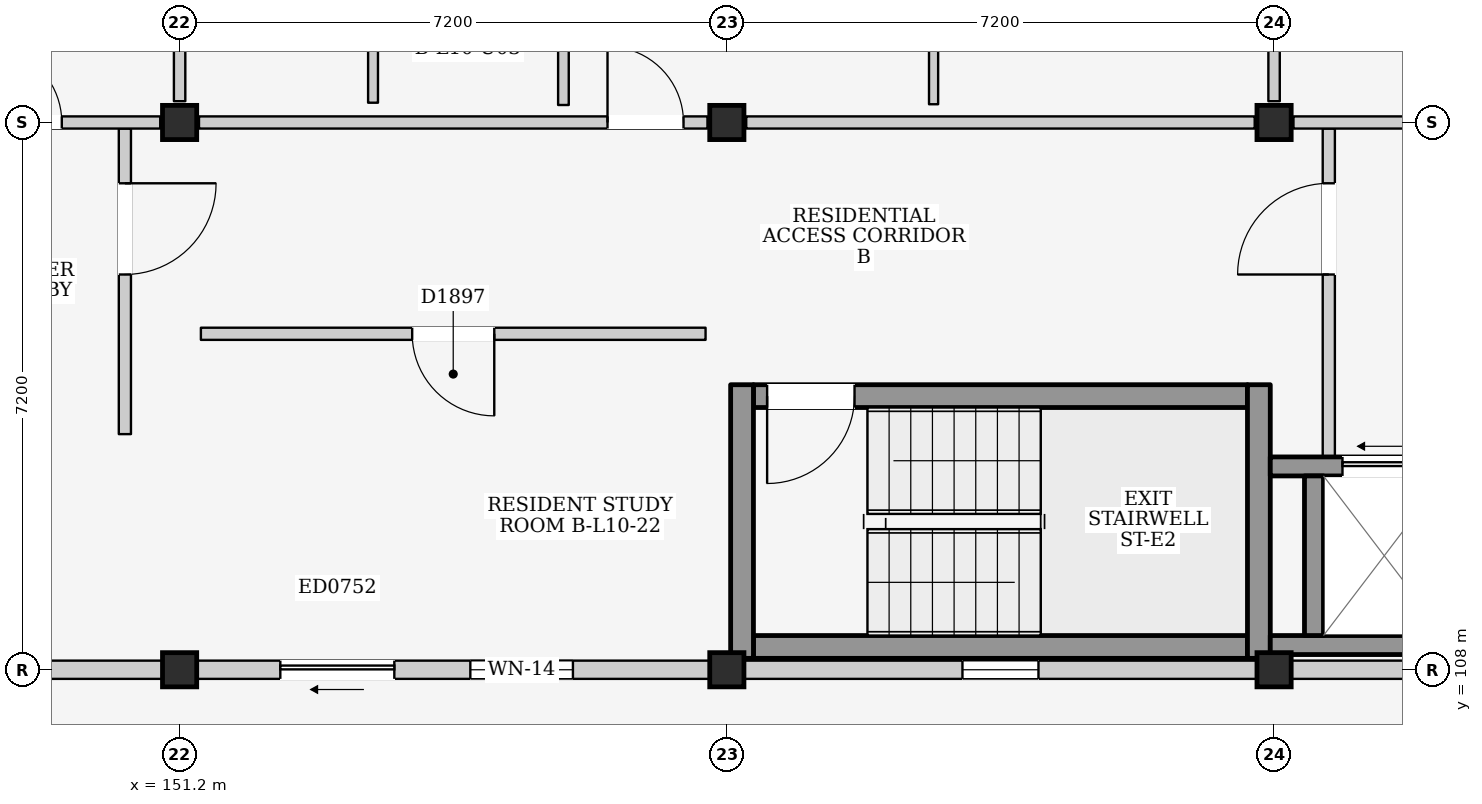
"""IFC4 building model, lengths in metres.
Left out: names, types, materials, properties, quantities, classifications, styles, units other than length and angle.
Written with IfcOpenShell. Run it as: python <this file> out.ifc"""

import sys

from ifc_helpers import new_model, si_unit, direction, frame, frame_2d, origin, origin_2d, place, context, subcontext, project, spatial, rectangle, extrude, element, fill, save


model = new_model("IFC4")
c1 = context("Model", 3, precision=1e-05, world=origin(), true_north=direction((0.0, 1.0)))
c2 = subcontext(c1, "Body", "Model", "MODEL_VIEW")
j1 = project(units=[si_unit("LENGTHUNIT", "METRE"), si_unit("PLANEANGLEUNIT", "RADIAN")], contexts=[c1])
p1 = place(None, origin())
s1 = spatial("IfcSite", under=j1, at=p1, CompositionType="ELEMENT")
p2 = place(p1, origin())
s2 = spatial("IfcBuilding", under=s1, at=p2, CompositionType="ELEMENT")
p3 = place(p2, frame((0.0, 0.0, 34.8)))
s3 = spatial("IfcBuildingStorey", under=s2, at=p3, CompositionType="ELEMENT", Elevation=34.8)
for number, where, z_axis, x_axis in (
    (1, (151.2, 108.0, 0.0), (0.0, 0.0, 1.0), (1.0, 0.0, 0.0)),
    (2, (151.2, 115.2, 0.0), (0.0, 0.0, 1.0), (1.0, 0.0, 0.0)),
    (3, (158.4, 108.0, 0.0), (0.0, 0.0, 1.0), (1.0, 0.0, 0.0)),
    (4, (158.4, 115.2, 0.0), (0.0, 0.0, 1.0), (1.0, 0.0, 0.0)),
    (5, (165.6, 108.0, 0.0), (0.0, 0.0, 1.0), (1.0, 0.0, 0.0)),
    (6, (165.6, 115.2, 0.0), (0.0, 0.0, 1.0), (1.0, 0.0, 0.0)),
):
    element("IfcColumn", number, at=place(p3, frame(where, z_axis=z_axis, x_axis=x_axis)), inside=s3, PredefinedType="COLUMN", context=c2, shape_type="SweptSolid", body=[
        extrude(rectangle(XDim=0.45, YDim=0.45, at=origin_2d()), origin(), (0.0, 0.0, 1.0), 3.2),
    ])
p4 = place(p3, frame((144.225, 108.0, 0.0), z_axis=(0.0, 0.0, 1.0), x_axis=(1.0, 0.0, 0.0)))
e7 = element("IfcWall", 7, at=p4, inside=s3, PredefinedType="ELEMENTEDWALL", context=c2, shape_type="SweptSolid", body=[
    extrude(rectangle(XDim=6.75, YDim=0.24, at=frame_2d((3.375, 0.0))), origin(), (0.0, 0.0, 1.0), 2.345),
])
p5 = place(p4, frame((2.875, 0.0, 1.2)))
e8 = element("IfcOpeningElement", 8, at=p5, cuts=e7, PredefinedType="OPENING", context=c2, shape_type="SweptSolid", body=[
    extrude(rectangle(XDim=1.0, YDim=0.9, at=frame_2d((0.5, 0.45))), frame((0.0, 0.135, 0.0), z_axis=(0.0, -1.0, 0.0), x_axis=(1.0, 0.0, 0.0)), (0.0, 0.0, 1.0), 0.27),
])
p6 = place(p3, frame((151.425, 108.0, 0.0), z_axis=(0.0, 0.0, 1.0), x_axis=(1.0, 0.0, 0.0)))
e9 = element("IfcWall", 9, at=p6, inside=s3, PredefinedType="ELEMENTEDWALL", context=c2, shape_type="SweptSolid", body=[
    extrude(rectangle(XDim=6.75, YDim=0.24, at=frame_2d((3.375, 0.0))), origin(), (0.0, 0.0, 1.0), 2.345),
])
p7 = place(p6, frame((1.1, 0.0, 0.0)))
e10 = element("IfcOpeningElement", 10, at=p7, cuts=e9, PredefinedType="OPENING", context=c2, shape_type="SweptSolid", body=[
    extrude(rectangle(XDim=1.5, YDim=2.12, at=frame_2d((0.75, 1.06))), frame((0.0, 0.135, 0.0), z_axis=(0.0, -1.0, 0.0), x_axis=(1.0, 0.0, 0.0)), (0.0, 0.0, 1.0), 0.27),
])
p8 = place(p6, frame((3.6, 0.0, 0.735)))
e11 = element("IfcOpeningElement", 11, at=p8, cuts=e9, PredefinedType="OPENING", context=c2, shape_type="SweptSolid", body=[
    extrude(rectangle(XDim=1.35, YDim=1.5, at=frame_2d((0.675, 0.75))), frame((0.0, 0.135, 0.0), z_axis=(0.0, -1.0, 0.0), x_axis=(1.0, 0.0, 0.0)), (0.0, 0.0, 1.0), 0.27),
])
p9 = place(p3, frame((158.625, 108.0, 0.0), z_axis=(0.0, 0.0, 1.0), x_axis=(1.0, 0.0, 0.0)))
e12 = element("IfcWall", 12, at=p9, inside=s3, PredefinedType="ELEMENTEDWALL", context=c2, shape_type="SweptSolid", body=[
    extrude(rectangle(XDim=6.75, YDim=0.24, at=frame_2d((3.375, 0.0))), origin(), (0.0, 0.0, 1.0), 2.345),
])
p10 = place(p9, frame((2.875, 0.0, 1.2)))
e13 = element("IfcOpeningElement", 13, at=p10, cuts=e12, PredefinedType="OPENING", context=c2, shape_type="SweptSolid", body=[
    extrude(rectangle(XDim=1.0, YDim=0.9, at=frame_2d((0.5, 0.45))), frame((0.0, 0.135, 0.0), z_axis=(0.0, -1.0, 0.0), x_axis=(1.0, 0.0, 0.0)), (0.0, 0.0, 1.0), 0.27),
])
p11 = place(p3, frame((165.825, 108.0, 0.0), z_axis=(0.0, 0.0, 1.0), x_axis=(1.0, 0.0, 0.0)))
e14 = element("IfcWall", 14, at=p11, inside=s3, PredefinedType="ELEMENTEDWALL", context=c2, shape_type="SweptSolid", body=[
    extrude(rectangle(XDim=6.75, YDim=0.24, at=frame_2d((3.375, 0.0))), origin(), (0.0, 0.0, 1.0), 2.345),
])
p12 = place(p11, frame((2.875, 0.0, 1.2)))
e15 = element("IfcOpeningElement", 15, at=p12, cuts=e14, PredefinedType="OPENING", context=c2, shape_type="SweptSolid", body=[
    extrude(rectangle(XDim=1.0, YDim=0.9, at=frame_2d((0.5, 0.45))), frame((0.0, 0.135, 0.0), z_axis=(0.0, -1.0, 0.0), x_axis=(1.0, 0.0, 0.0)), (0.0, 0.0, 1.0), 0.27),
])
p13 = place(p3, frame((150.48, 111.1, 0.0), z_axis=(0.0, 0.0, 1.0), x_axis=(0.0, 1.0, 0.0)))
e16 = element("IfcWall", 16, at=p13, inside=s3, PredefinedType="PARTITIONING", context=c2, shape_type="SweptSolid", body=[
    extrude(rectangle(XDim=4.02, YDim=0.16, at=frame_2d((2.01, 0.0))), origin(), (0.0, 0.0, 1.0), 2.96),
])
p14 = place(p13, frame((2.1, 0.0, 0.0)))
e17 = element("IfcOpeningElement", 17, at=p14, cuts=e16, PredefinedType="OPENING", context=c2, shape_type="SweptSolid", body=[
    extrude(rectangle(XDim=1.2, YDim=2.2, at=frame_2d((0.6, 1.1))), frame((0.0, 0.095, 0.0), z_axis=(0.0, -1.0, 0.0), x_axis=(1.0, 0.0, 0.0)), (0.0, 0.0, 1.0), 0.19),
])
p15 = place(p3, frame((158.75, 108.3, 0.0), z_axis=(0.0, 0.0, 1.0), x_axis=(1.0, 0.0, 0.0)))
e18 = element("IfcWall", 18, at=p15, inside=s3, PredefinedType="SHEAR", context=c2, shape_type="SweptSolid", body=[
    extrude(rectangle(XDim=6.5, YDim=0.3, at=frame_2d((3.25, 0.0))), origin(), (0.0, 0.0, 1.0), 2.96),
])
p16 = place(p3, frame((158.75, 111.6, 0.0), z_axis=(0.0, 0.0, 1.0), x_axis=(1.0, 0.0, 0.0)))
e19 = element("IfcWall", 19, at=p16, inside=s3, PredefinedType="SHEAR", context=c2, shape_type="SweptSolid", body=[
    extrude(rectangle(XDim=6.5, YDim=0.3, at=frame_2d((3.25, 0.0))), origin(), (0.0, 0.0, 1.0), 2.96),
])
p17 = place(p16, frame((0.18, 0.0, 0.0)))
e20 = element("IfcOpeningElement", 20, at=p17, cuts=e19, PredefinedType="OPENING", context=c2, shape_type="SweptSolid", body=[
    extrude(rectangle(XDim=1.15, YDim=2.2, at=frame_2d((0.575, 1.1))), frame((0.0, 0.165, 0.0), z_axis=(0.0, -1.0, 0.0), x_axis=(1.0, 0.0, 0.0)), (0.0, 0.0, 1.0), 0.33),
])
for number, where, z_axis, x_axis in (
    (21, (158.6, 108.15, 0.0), (0.0, 0.0, 1.0), (0.0, 1.0, 0.0)),
    (22, (165.4, 108.15, 0.0), (0.0, 0.0, 1.0), (0.0, 1.0, 0.0)),
):
    element("IfcWall", number, at=place(p3, frame(where, z_axis=z_axis, x_axis=x_axis)), inside=s3, PredefinedType="SHEAR", context=c2, shape_type="SweptSolid", body=[
        extrude(rectangle(XDim=3.6, YDim=0.3, at=frame_2d((1.8, 0.0))), origin(), (0.0, 0.0, 1.0), 2.96),
    ])
p18 = place(p3, frame((166.32, 110.8, 0.0), z_axis=(0.0, 0.0, 1.0), x_axis=(0.0, 1.0, 0.0)))
e23 = element("IfcWall", 23, at=p18, inside=s3, PredefinedType="PARTITIONING", context=c2, shape_type="SweptSolid", body=[
    extrude(rectangle(XDim=4.32, YDim=0.16, at=frame_2d((2.16, 0.0))), origin(), (0.0, 0.0, 1.0), 2.96),
])
p19 = place(p18, frame((2.4, 0.0, 0.0)))
e24 = element("IfcOpeningElement", 24, at=p19, cuts=e23, PredefinedType="OPENING", context=c2, shape_type="SweptSolid", body=[
    extrude(rectangle(XDim=1.2, YDim=2.2, at=frame_2d((0.6, 1.1))), frame((0.0, 0.095, 0.0), z_axis=(0.0, -1.0, 0.0), x_axis=(1.0, 0.0, 0.0)), (0.0, 0.0, 1.0), 0.19),
])
p20 = place(p3, frame((165.55, 108.325, 0.0), z_axis=(0.0, 0.0, 1.0), x_axis=(1.0, 0.0, 0.0)))
e25 = element("IfcWall", 25, at=p20, inside=s3, PredefinedType="SHEAR", context=c2, shape_type="SweptSolid", body=[
    extrude(rectangle(XDim=2.55, YDim=0.25, at=frame_2d((1.275, 0.0))), origin(), (0.0, 0.0, 1.0), 2.96),
])
p21 = place(p3, frame((165.55, 110.675, 0.0), z_axis=(0.0, 0.0, 1.0), x_axis=(1.0, 0.0, 0.0)))
e26 = element("IfcWall", 26, at=p21, inside=s3, PredefinedType="SHEAR", context=c2, shape_type="SweptSolid", body=[
    extrude(rectangle(XDim=2.55, YDim=0.25, at=frame_2d((1.275, 0.0))), origin(), (0.0, 0.0, 1.0), 2.96),
])
p22 = place(p21, frame((0.95, 0.0, 0.0)))
e27 = element("IfcOpeningElement", 27, at=p22, cuts=e26, PredefinedType="OPENING", context=c2, shape_type="SweptSolid", body=[
    extrude(rectangle(XDim=1.1, YDim=2.15, at=frame_2d((0.55, 1.075))), frame((0.0, 0.14, 0.0), z_axis=(0.0, -1.0, 0.0), x_axis=(1.0, 0.0, 0.0)), (0.0, 0.0, 1.0), 0.28),
])
p23 = place(p3, frame((166.125, 108.45, 0.0), z_axis=(0.0, 0.0, 1.0), x_axis=(0.0, 1.0, 0.0)))
e28 = element("IfcWall", 28, at=p23, inside=s3, PredefinedType="SHEAR", context=c2, shape_type="SweptSolid", body=[
    extrude(rectangle(XDim=2.1, YDim=0.25, at=frame_2d((1.05, 0.0))), origin(), (0.0, 0.0, 1.0), 2.96),
])
p24 = place(p3, frame((144.255, 115.2, 0.0), z_axis=(0.0, 0.0, 1.0), x_axis=(1.0, 0.0, 0.0)))
e29 = element("IfcWall", 29, at=p24, inside=s3, PredefinedType="PARTITIONING", context=c2, shape_type="SweptSolid", body=[
    extrude(rectangle(XDim=6.69, YDim=0.16, at=frame_2d((3.345, 0.0))), origin(), (0.0, 0.0, 1.0), 2.345),
])
p25 = place(p24, frame((4.395, 0.0, 0.0)))
e30 = element("IfcOpeningElement", 30, at=p25, cuts=e29, PredefinedType="OPENING", context=c2, shape_type="SweptSolid", body=[
    extrude(rectangle(XDim=1.0, YDim=2.15, at=frame_2d((0.5, 1.075))), frame((0.0, 0.095, 0.0), z_axis=(0.0, -1.0, 0.0), x_axis=(1.0, 0.0, 0.0)), (0.0, 0.0, 1.0), 0.19),
])
p26 = place(p3, frame((151.2, 115.48, 0.0), z_axis=(0.0, 0.0, 1.0), x_axis=(0.0, 1.0, 0.0)))
e31 = element("IfcWall", 31, at=p26, inside=s3, PredefinedType="PARTITIONING", context=c2, shape_type="SweptSolid", body=[
    extrude(rectangle(XDim=6.64, YDim=0.15, at=frame_2d((3.32, 0.0))), origin(), (0.0, 0.0, 1.0), 2.445),
])
p27 = place(p3, frame((151.455, 115.2, 0.0), z_axis=(0.0, 0.0, 1.0), x_axis=(1.0, 0.0, 0.0)))
e32 = element("IfcWall", 32, at=p27, inside=s3, PredefinedType="PARTITIONING", context=c2, shape_type="SweptSolid", body=[
    extrude(rectangle(XDim=6.69, YDim=0.16, at=frame_2d((3.345, 0.0))), origin(), (0.0, 0.0, 1.0), 2.345),
])
p28 = place(p27, frame((5.375, 0.0, 0.0)))
e33 = element("IfcOpeningElement", 33, at=p28, cuts=e32, PredefinedType="OPENING", context=c2, shape_type="SweptSolid", body=[
    extrude(rectangle(XDim=1.0, YDim=2.15, at=frame_2d((0.5, 1.075))), frame((0.0, 0.095, 0.0), z_axis=(0.0, -1.0, 0.0), x_axis=(1.0, 0.0, 0.0)), (0.0, 0.0, 1.0), 0.19),
])
p29 = place(p3, frame((158.655, 115.2, 0.0), z_axis=(0.0, 0.0, 1.0), x_axis=(1.0, 0.0, 0.0)))
e34 = element("IfcWall", 34, at=p29, inside=s3, PredefinedType="PARTITIONING", context=c2, shape_type="SweptSolid", body=[
    extrude(rectangle(XDim=6.69, YDim=0.16, at=frame_2d((3.345, 0.0))), origin(), (0.0, 0.0, 1.0), 2.345),
])
p30 = place(p3, frame((165.6, 115.48, 0.0), z_axis=(0.0, 0.0, 1.0), x_axis=(0.0, 1.0, 0.0)))
e35 = element("IfcWall", 35, at=p30, inside=s3, PredefinedType="PARTITIONING", context=c2, shape_type="SweptSolid", body=[
    extrude(rectangle(XDim=6.64, YDim=0.15, at=frame_2d((3.32, 0.0))), origin(), (0.0, 0.0, 1.0), 2.445),
])
p31 = place(p3, frame((153.745, 115.46, 0.0), z_axis=(0.0, 0.0, 1.0), x_axis=(0.0, 1.0, 0.0)))
e36 = element("IfcWall", 36, at=p31, inside=s3, PredefinedType="PARTITIONING", context=c2, shape_type="SweptSolid", body=[
    extrude(rectangle(XDim=3.04, YDim=0.13, at=frame_2d((1.52, 0.0))), origin(), (0.0, 0.0, 1.0), 2.96),
])
p32 = place(p3, frame((156.25, 115.43, 0.0), z_axis=(0.0, 0.0, 1.0), x_axis=(0.0, 1.0, 0.0)))
e37 = element("IfcWall", 37, at=p32, inside=s3, PredefinedType="PARTITIONING", context=c2, shape_type="SweptSolid", body=[
    extrude(rectangle(XDim=3.06, YDim=0.14, at=frame_2d((1.53, 0.0))), origin(), (0.0, 0.0, 1.0), 2.96),
])
p33 = place(p3, frame((161.12, 115.44, 0.0), z_axis=(0.0, 0.0, 1.0), x_axis=(0.0, 1.0, 0.0)))
e38 = element("IfcWall", 38, at=p33, inside=s3, PredefinedType="PARTITIONING", context=c2, shape_type="SweptSolid", body=[
    extrude(rectangle(XDim=3.04, YDim=0.12, at=frame_2d((1.52, 0.0))), origin(), (0.0, 0.0, 1.0), 2.96),
])
p34 = place(p33, frame((1.04, 0.0, 0.0)))
e39 = element("IfcOpeningElement", 39, at=p34, cuts=e38, PredefinedType="OPENING", context=c2, shape_type="SweptSolid", body=[
    extrude(rectangle(XDim=0.96, YDim=2.15, at=frame_2d((0.48, 1.075))), frame((0.0, 0.075, 0.0), z_axis=(0.0, -1.0, 0.0), x_axis=(1.0, 0.0, 0.0)), (0.0, 0.0, 1.0), 0.15),
])
p35 = place(p3, frame((165.855, 115.2, 0.0), z_axis=(0.0, 0.0, 1.0), x_axis=(1.0, 0.0, 0.0)))
e40 = element("IfcWall", 40, at=p35, inside=s3, PredefinedType="PARTITIONING", context=c2, shape_type="SweptSolid", body=[
    extrude(rectangle(XDim=6.69, YDim=0.16, at=frame_2d((3.345, 0.0))), origin(), (0.0, 0.0, 1.0), 2.345),
])
p36 = place(p35, frame((4.395, 0.0, 0.0)))
e41 = element("IfcOpeningElement", 41, at=p36, cuts=e40, PredefinedType="OPENING", context=c2, shape_type="SweptSolid", body=[
    extrude(rectangle(XDim=1.0, YDim=2.15, at=frame_2d((0.5, 1.075))), frame((0.0, 0.095, 0.0), z_axis=(0.0, -1.0, 0.0), x_axis=(1.0, 0.0, 0.0)), (0.0, 0.0, 1.0), 0.19),
])
p37 = place(p3, frame((151.48, 112.42, 0.0), z_axis=(0.0, 0.0, 1.0), x_axis=(1.0, 0.0, 0.0)))
e42 = element("IfcWall", 42, at=p37, inside=s3, PredefinedType="PARTITIONING", context=c2, shape_type="SweptSolid", body=[
    extrude(rectangle(XDim=6.64, YDim=0.16, at=frame_2d((3.32, 0.0))), origin(), (0.0, 0.0, 1.0), 2.96),
])
p38 = place(p37, frame((2.78, 0.0, 0.0)))
e43 = element("IfcOpeningElement", 43, at=p38, cuts=e42, PredefinedType="OPENING", context=c2, shape_type="SweptSolid", body=[
    extrude(rectangle(XDim=1.08, YDim=2.22, at=frame_2d((0.54, 1.11))), frame((0.0, 0.095, 0.0), z_axis=(0.0, -1.0, 0.0), x_axis=(1.0, 0.0, 0.0)), (0.0, 0.0, 1.0), 0.19),
])
p39 = place(p7, frame((1.5, 0.0, 0.0), z_axis=(0.0, 0.0, 1.0), x_axis=(-1.0, 0.0, 0.0)))
e44 = element("IfcDoor", 44, at=p39, inside=s3, OperationType="SLIDING_TO_LEFT", PredefinedType="DOOR", context=c2, shape_type="SweptSolid", body=[
    extrude(rectangle(XDim=1.5, YDim=2.12, at=frame_2d((0.75, 1.06))), frame((0.0, 0.025, 0.0), z_axis=(0.0, -1.0, 0.0), x_axis=(1.0, 0.0, 0.0)), (0.0, 0.0, 1.0), 0.05),
])
fill(e10, e44)
p40 = place(p8, origin())
e45 = element("IfcWindow", 45, at=p40, inside=s3, PartitioningType="SINGLE_PANEL", PredefinedType="WINDOW", context=c2, shape_type="SweptSolid", body=[
    extrude(rectangle(XDim=1.35, YDim=1.5, at=frame_2d((0.675, 0.75))), frame((0.0, 0.03, 0.0), z_axis=(0.0, -1.0, 0.0), x_axis=(1.0, 0.0, 0.0)), (0.0, 0.0, 1.0), 0.06),
])
fill(e11, e45)
p41 = place(p10, origin())
e46 = element("IfcWindow", 46, at=p41, inside=s3, PartitioningType="SINGLE_PANEL", PredefinedType="WINDOW", context=c2, shape_type="SweptSolid", body=[
    extrude(rectangle(XDim=1.0, YDim=0.9, at=frame_2d((0.5, 0.45))), frame((0.0, 0.03, 0.0), z_axis=(0.0, -1.0, 0.0), x_axis=(1.0, 0.0, 0.0)), (0.0, 0.0, 1.0), 0.06),
])
fill(e13, e46)
p42 = place(p14, frame((1.2, 0.0, 0.0), z_axis=(0.0, 0.0, 1.0), x_axis=(-1.0, 0.0, 0.0)))
e47 = element("IfcDoor", 47, at=p42, inside=s3, OperationType="SINGLE_SWING_LEFT", PredefinedType="DOOR", context=c2, shape_type="SweptSolid", body=[
    extrude(rectangle(XDim=1.2, YDim=2.2, at=frame_2d((0.6, 1.1))), frame((0.0, 0.025, 0.0), z_axis=(0.0, -1.0, 0.0), x_axis=(1.0, 0.0, 0.0)), (0.0, 0.0, 1.0), 0.05),
])
fill(e17, e47)
p43 = place(p17, frame((1.15, 0.0, 0.0), z_axis=(0.0, 0.0, 1.0), x_axis=(-1.0, 0.0, 0.0)))
e48 = element("IfcDoor", 48, at=p43, inside=s3, OperationType="SINGLE_SWING_RIGHT", PredefinedType="DOOR", context=c2, shape_type="SweptSolid", body=[
    extrude(rectangle(XDim=1.15, YDim=2.2, at=frame_2d((0.575, 1.1))), frame((0.0, 0.025, 0.0), z_axis=(0.0, -1.0, 0.0), x_axis=(1.0, 0.0, 0.0)), (0.0, 0.0, 1.0), 0.05),
])
fill(e20, e48)
p44 = place(p19, origin())
e49 = element("IfcDoor", 49, at=p44, inside=s3, OperationType="SINGLE_SWING_LEFT", PredefinedType="DOOR", context=c2, shape_type="SweptSolid", body=[
    extrude(rectangle(XDim=1.2, YDim=2.2, at=frame_2d((0.6, 1.1))), frame((0.0, 0.025, 0.0), z_axis=(0.0, -1.0, 0.0), x_axis=(1.0, 0.0, 0.0)), (0.0, 0.0, 1.0), 0.05),
])
fill(e24, e49)
p45 = place(p22, origin())
e50 = element("IfcDoor", 50, at=p45, inside=s3, OperationType="SLIDING_TO_LEFT", PredefinedType="DOOR", context=c2, shape_type="SweptSolid", body=[
    extrude(rectangle(XDim=1.1, YDim=2.15, at=frame_2d((0.55, 1.075))), frame((0.0, 0.025, 0.0), z_axis=(0.0, -1.0, 0.0), x_axis=(1.0, 0.0, 0.0)), (0.0, 0.0, 1.0), 0.05),
])
fill(e27, e50)
p46 = place(p25, origin())
e51 = element("IfcDoor", 51, at=p46, inside=s3, OperationType="SINGLE_SWING_LEFT", PredefinedType="DOOR", context=c2, shape_type="SweptSolid", body=[
    extrude(rectangle(XDim=1.0, YDim=2.15, at=frame_2d((0.5, 1.075))), frame((0.0, 0.025, 0.0), z_axis=(0.0, -1.0, 0.0), x_axis=(1.0, 0.0, 0.0)), (0.0, 0.0, 1.0), 0.05),
])
fill(e30, e51)
p47 = place(p28, origin())
e52 = element("IfcDoor", 52, at=p47, inside=s3, OperationType="SINGLE_SWING_LEFT", PredefinedType="DOOR", context=c2, shape_type="SweptSolid", body=[
    extrude(rectangle(XDim=1.0, YDim=2.15, at=frame_2d((0.5, 1.075))), frame((0.0, 0.025, 0.0), z_axis=(0.0, -1.0, 0.0), x_axis=(1.0, 0.0, 0.0)), (0.0, 0.0, 1.0), 0.05),
])
fill(e33, e52)
p48 = place(p38, frame((1.08, 0.0, 0.0), z_axis=(0.0, 0.0, 1.0), x_axis=(-1.0, 0.0, 0.0)))
e53 = element("IfcDoor", 53, at=p48, inside=s3, OperationType="SINGLE_SWING_LEFT", PredefinedType="DOOR", context=c2, shape_type="SweptSolid", body=[
    extrude(rectangle(XDim=1.08, YDim=2.22, at=frame_2d((0.54, 1.11))), frame((0.0, 0.025, 0.0), z_axis=(0.0, -1.0, 0.0), x_axis=(1.0, 0.0, 0.0)), (0.0, 0.0, 1.0), 0.05),
])
fill(e43, e53)
save(model, sys.argv[1])
